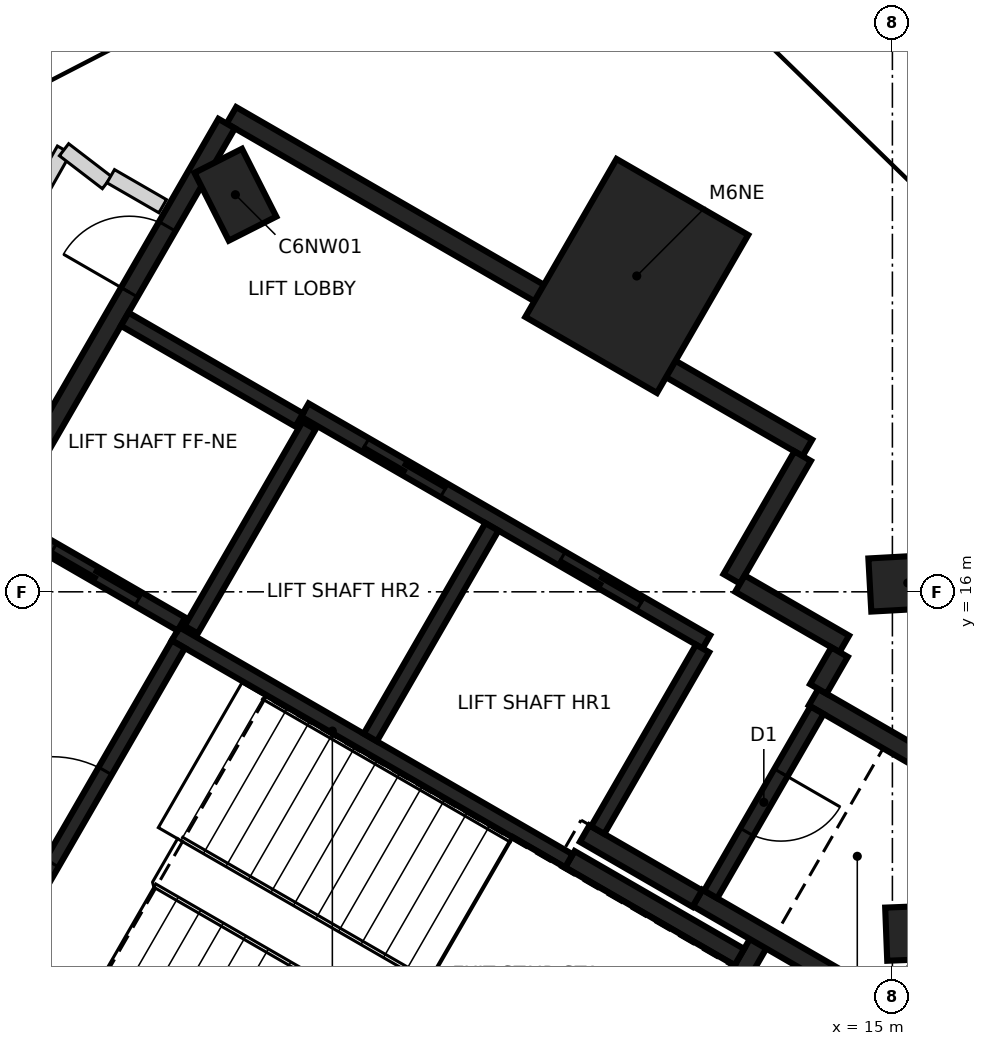
"""IFC4 building model, lengths in metres.
Left out: names, types, materials, properties, quantities, classifications, styles, units other than length and angle.
Written with IfcOpenShell. Run it as: python <this file> out.ifc"""

import sys

from ifc_helpers import new_model, si_unit, direction, frame, frame_2d, origin, origin_2d, place, context, subcontext, project, spatial, rectangle, extrude, element, fill, save


model = new_model("IFC4")
c1 = context("Model", 3, precision=1e-05, world=origin(), true_north=direction((0.0, 1.0)))
c2 = subcontext(c1, "Body", "Model", "MODEL_VIEW")
j1 = project(units=[si_unit("LENGTHUNIT", "METRE"), si_unit("PLANEANGLEUNIT", "RADIAN")], contexts=[c1])
p1 = place(None, origin())
s1 = spatial("IfcSite", under=j1, at=p1, CompositionType="ELEMENT")
p2 = place(p1, origin())
s2 = spatial("IfcBuilding", under=s1, at=p2, CompositionType="ELEMENT")
p3 = place(p2, frame((0.0, 0.0, 280.2)))
s3 = spatial("IfcBuildingStorey", under=s2, at=p3, CompositionType="ELEMENT", Elevation=280.2)
for number, where, z_axis, x_axis in (
    (1, (15.418, 11.515, -0.35), (0.0, 0.0, 1.0), (0.999, 0.039, 0.0)),
    (2, (15.202, 16.117, -0.35), (0.0, 0.0, 1.0), (0.998, 0.055, 0.0)),
    (3, (6.356, 21.224, -0.35), (0.0, 0.0, 1.0), (-0.452, 0.892, 0.0)),
):
    element("IfcColumn", number, at=place(p3, frame(where, z_axis=z_axis, x_axis=x_axis)), inside=s3, PredefinedType="COLUMN", context=c2, shape_type="SweptSolid", body=[
        extrude(rectangle(XDim=1.0, YDim=0.7, at=origin_2d()), origin(), (0.0, 0.0, 1.0), 3.6),
    ])
p4 = place(p3, frame((11.637, 20.155, -0.35), z_axis=(0.0, 0.0, 1.0), x_axis=(0.5, 0.866025403784, 0.0)))
e4 = element("IfcColumn", 4, at=p4, inside=s3, PredefinedType="COLUMN", context=c2, shape_type="SweptSolid", body=[
    extrude(rectangle(XDim=2.4, YDim=2.0, at=origin_2d()), origin(), (0.0, 0.0, 1.0), 3.6),
])
p5 = place(p3, frame((10.42, 6.498, 0.0), z_axis=(0.0, 0.0, 1.0), x_axis=(-0.866021906294, 0.500006057782, 0.0)))
e5 = element("IfcWall", 5, at=p5, inside=s3, PredefinedType="SHEAR", context=c2, shape_type="SweptSolid", body=[
    extrude(rectangle(XDim=11.55, YDim=0.25, at=frame_2d((5.775, 0.0))), origin(), (0.0, 0.0, 1.0), 3.25),
])
p6 = place(p5, frame((10.025, 0.0, 0.0)))
e6 = element("IfcOpeningElement", 6, at=p6, cuts=e5, PredefinedType="OPENING", context=c2, shape_type="SweptSolid", body=[
    extrude(rectangle(XDim=1.2, YDim=2.1, at=frame_2d((0.6, 1.05))), frame((0.0, 0.135, 0.0), z_axis=(0.0, -1.0, 0.0), x_axis=(1.0, 0.0, 0.0)), (0.0, 0.0, 1.0), 0.27),
])
p7 = place(p5, frame((8.725, 0.0, 0.0)))
e7 = element("IfcOpeningElement", 7, at=p7, cuts=e5, PredefinedType="OPENING", context=c2, shape_type="SweptSolid", body=[
    extrude(rectangle(XDim=1.2, YDim=2.1, at=frame_2d((0.6, 1.05))), frame((0.0, 0.135, 0.0), z_axis=(0.0, -1.0, 0.0), x_axis=(1.0, 0.0, 0.0)), (0.0, 0.0, 1.0), 0.27),
])
p8 = place(p3, frame((6.304, 22.269, 0.0), z_axis=(0.0, 0.0, 1.0), x_axis=(0.866022959057, -0.500004234368, 0.0)))
e8 = element("IfcWall", 8, at=p8, inside=s3, PredefinedType="SHEAR", context=c2, shape_type="SweptSolid", body=[
    extrude(rectangle(XDim=8.75, YDim=0.25, at=frame_2d((4.375, 0.0))), origin(), (0.0, 0.0, 1.0), 3.25),
])
p9 = place(p3, frame((3.179, 16.856, 0.0), z_axis=(0.0, 0.0, 1.0), x_axis=(0.500001955336, 0.866024274868, 0.0)))
e9 = element("IfcWall", 9, at=p9, inside=s3, PredefinedType="SHEAR", context=c2, shape_type="SweptSolid", body=[
    extrude(rectangle(XDim=6.125, YDim=0.25, at=frame_2d((3.062, 0.0))), origin(), (0.0, 0.0, 1.0), 3.25),
])
p10 = place(p9, frame((3.563, 0.0, 0.0)))
e10 = element("IfcOpeningElement", 10, at=p10, cuts=e9, PredefinedType="OPENING", context=c2, shape_type="SweptSolid", body=[
    extrude(rectangle(XDim=1.0, YDim=2.1, at=frame_2d((0.5, 1.05))), frame((0.0, 0.135, 0.0), z_axis=(0.0, -1.0, 0.0), x_axis=(1.0, 0.0, 0.0)), (0.0, 0.0, 1.0), 0.27),
])
p11 = place(p3, frame((13.238, 11.378, 0.0), z_axis=(0.0, 0.0, 1.0), x_axis=(-0.500008851346, -0.866020293397, 0.0)))
e11 = element("IfcWall", 11, at=p11, inside=s3, PredefinedType="SHEAR", context=c2, shape_type="SweptSolid", body=[
    extrude(rectangle(XDim=5.51, YDim=0.25, at=frame_2d((2.755, 0.0))), origin(), (0.0, 0.0, 1.0), 3.25),
])
p12 = place(p3, frame((16.552, 13.119, 0.0), z_axis=(0.0, 0.0, 1.0), x_axis=(-0.499978833458, -0.866037623948, 0.0)))
e12 = element("IfcWall", 12, at=p12, inside=s3, PredefinedType="SHEAR", context=c2, shape_type="SweptSolid", body=[
    extrude(rectangle(XDim=3.05, YDim=0.25, at=frame_2d((1.525, 0.0))), origin(), (0.0, 0.0, 1.0), 3.25),
])
p13 = place(p3, frame((14.918, 10.54, 0.0), z_axis=(0.0, 0.0, 1.0), x_axis=(-0.866063538972, 0.499933942099, 0.0)))
e13 = element("IfcWall", 13, at=p13, inside=s3, PredefinedType="SHEAR", context=c2, shape_type="SweptSolid", body=[
    extrude(rectangle(XDim=2.865, YDim=0.25, at=frame_2d((1.432, 0.0))), origin(), (0.0, 0.0, 1.0), 3.25),
])
p14 = place(p3, frame((13.963, 14.614, 0.0), z_axis=(0.0, 0.0, 1.0), x_axis=(0.866042235819, -0.499970844928, 0.0)))
e14 = element("IfcWall", 14, at=p14, inside=s3, PredefinedType="SHEAR", context=c2, shape_type="SweptSolid", body=[
    extrude(rectangle(XDim=2.865, YDim=0.25, at=frame_2d((1.432, 0.0))), origin(), (0.0, 0.0, 1.0), 3.25),
])
p15 = place(p3, frame((10.757, 12.481, 0.0), z_axis=(0.0, 0.0, 1.0), x_axis=(0.866022940537, -0.500004266446, 0.0)))
e15 = element("IfcWall", 15, at=p15, inside=s3, PredefinedType="SHEAR", context=c2, shape_type="SweptSolid", body=[
    extrude(rectangle(XDim=2.575, YDim=0.25, at=frame_2d((1.287, 0.0))), origin(), (0.0, 0.0, 1.0), 3.25),
])
p16 = place(p3, frame((13.819, 17.785, 0.0), z_axis=(0.0, 0.0, 1.0), x_axis=(-0.500039802285, -0.866002422705, 0.0)))
e16 = element("IfcWall", 16, at=p16, inside=s3, PredefinedType="SHEAR", context=c2, shape_type="SweptSolid", body=[
    extrude(rectangle(XDim=1.865, YDim=0.25, at=frame_2d((0.932, 0.0))), origin(), (0.0, 0.0, 1.0), 3.25),
])
p17 = place(p3, frame((12.433, 11.964, 0.0), z_axis=(0.0, 0.0, 1.0), x_axis=(-0.866038183914, 0.499977863513, 0.0)))
e17 = element("IfcWall", 17, at=p17, inside=s3, PredefinedType="SHEAR", context=c2, shape_type="SweptSolid", body=[
    extrude(rectangle(XDim=1.71, YDim=0.25, at=frame_2d((0.855, 0.0))), origin(), (0.0, 0.0, 1.0), 3.25),
])
p18 = place(p3, frame((12.995, 16.108, 0.0), z_axis=(0.0, 0.0, 1.0), x_axis=(0.866044474677, -0.49996696679, 0.0)))
e18 = element("IfcWall", 18, at=p18, inside=s3, PredefinedType="SHEAR", context=c2, shape_type="SweptSolid", body=[
    extrude(rectangle(XDim=1.584, YDim=0.25, at=frame_2d((0.792, 0.0))), origin(), (0.0, 0.0, 1.0), 3.25),
])
p19 = place(p3, frame((14.305, 15.207, 0.0), z_axis=(0.0, 0.0, 1.0), x_axis=(-0.499848422343, -0.866112899501, 0.0)))
e19 = element("IfcWall", 19, at=p19, inside=s3, PredefinedType="SHEAR", context=c2, shape_type="SweptSolid", body=[
    extrude(rectangle(XDim=0.559, YDim=0.25, at=frame_2d((0.28, 0.0))), origin(), (0.0, 0.0, 1.0), 3.25),
])
p20 = place(p3, frame((12.552, 15.342, 0.0), z_axis=(0.0, 0.0, 1.0), x_axis=(-0.866030299012, 0.499991521122, 0.0)))
e20 = element("IfcWall", 20, at=p20, inside=s3, PredefinedType="SHEAR", context=c2, shape_type="SweptSolid", body=[
    extrude(rectangle(XDim=6.1, YDim=0.2, at=frame_2d((3.05, 0.0))), origin(), (0.0, 0.0, 1.0), 3.25),
])
p21 = place(p20, frame((1.0, 0.0, 0.0)))
e21 = element("IfcOpeningElement", 21, at=p21, cuts=e20, PredefinedType="OPENING", context=c2, shape_type="SweptSolid", body=[
    extrude(rectangle(XDim=1.2, YDim=2.1, at=frame_2d((0.6, 1.05))), frame((0.0, 0.11, 0.0), z_axis=(0.0, -1.0, 0.0), x_axis=(1.0, 0.0, 0.0)), (0.0, 0.0, 1.0), 0.22),
])
p22 = place(p20, frame((3.982, 0.0, 0.0)))
e22 = element("IfcOpeningElement", 22, at=p22, cuts=e20, PredefinedType="OPENING", context=c2, shape_type="SweptSolid", body=[
    extrude(rectangle(XDim=1.2, YDim=2.1, at=frame_2d((0.6, 1.05))), frame((0.0, 0.11, 0.0), z_axis=(0.0, -1.0, 0.0), x_axis=(1.0, 0.0, 0.0)), (0.0, 0.0, 1.0), 0.22),
])
p23 = place(p3, frame((10.743, 12.46, 0.0), z_axis=(0.0, 0.0, 1.0), x_axis=(-0.866018848283, 0.500011354289, 0.0)))
e23 = element("IfcWall", 23, at=p23, inside=s3, PredefinedType="SHEAR", context=c2, shape_type="SweptSolid", body=[
    extrude(rectangle(XDim=5.974, YDim=0.2, at=frame_2d((2.987, 0.0))), origin(), (0.0, 0.0, 1.0), 3.25),
])
p24 = place(p3, frame((3.057, 10.895, 0.0), z_axis=(0.0, 0.0, 1.0), x_axis=(0.500027839223, 0.866009330205, 0.0)))
e24 = element("IfcWall", 24, at=p24, inside=s3, PredefinedType="SHEAR", context=c2, shape_type="SweptSolid", body=[
    extrude(rectangle(XDim=5.098, YDim=0.2, at=frame_2d((2.549, 0.0))), origin(), (0.0, 0.0, 1.0), 3.25),
])
p25 = place(p24, frame((1.774, 0.0, 0.0)))
e25 = element("IfcOpeningElement", 25, at=p25, cuts=e24, PredefinedType="OPENING", context=c2, shape_type="SweptSolid", body=[
    extrude(rectangle(XDim=1.4, YDim=2.1, at=frame_2d((0.7, 1.05))), frame((0.0, 0.11, 0.0), z_axis=(0.0, -1.0, 0.0), x_axis=(1.0, 0.0, 0.0)), (0.0, 0.0, 1.0), 0.22),
])
p26 = place(p3, frame((8.132, 14.084, 0.0), z_axis=(0.0, 0.0, 1.0), x_axis=(0.500030834389, 0.86600760081, 0.0)))
e26 = element("IfcWall", 26, at=p26, inside=s3, PredefinedType="SHEAR", context=c2, shape_type="SweptSolid", body=[
    extrude(rectangle(XDim=3.198, YDim=0.2, at=frame_2d((1.599, 0.0))), origin(), (0.0, 0.0, 1.0), 3.25),
])
p27 = place(p3, frame((14.008, 14.442, 0.0), z_axis=(0.0, 0.0, 1.0), x_axis=(-0.499986818241, -0.866033014143, 0.0)))
e27 = element("IfcWall", 27, at=p27, inside=s3, PredefinedType="SHEAR", context=c2, shape_type="SweptSolid", body=[
    extrude(rectangle(XDim=2.798, YDim=0.2, at=frame_2d((1.399, 0.0))), origin(), (0.0, 0.0, 1.0), 3.25),
])
p28 = place(p27, frame((0.949, 0.0, 0.0)))
e28 = element("IfcOpeningElement", 28, at=p28, cuts=e27, PredefinedType="OPENING", context=c2, shape_type="SweptSolid", body=[
    extrude(rectangle(XDim=0.9, YDim=2.1, at=frame_2d((0.45, 1.05))), frame((0.0, 0.11, 0.0), z_axis=(0.0, -1.0, 0.0), x_axis=(1.0, 0.0, 0.0)), (0.0, 0.0, 1.0), 0.22),
])
p29 = place(p3, frame((12.502, 15.255, 0.0), z_axis=(0.0, 0.0, 1.0), x_axis=(-0.499965018551, -0.866045599391, 0.0)))
e29 = element("IfcWall", 29, at=p29, inside=s3, PredefinedType="SHEAR", context=c2, shape_type="SweptSolid", body=[
    extrude(rectangle(XDim=2.759, YDim=0.2, at=frame_2d((1.379, 0.0))), origin(), (0.0, 0.0, 1.0), 3.25),
])
p30 = place(p3, frame((7.324, 18.187, 0.0), z_axis=(0.0, 0.0, 1.0), x_axis=(-0.499967891604, -0.866043940782, 0.0)))
e30 = element("IfcWall", 30, at=p30, inside=s3, PredefinedType="SHEAR", context=c2, shape_type="SweptSolid", body=[
    extrude(rectangle(XDim=3.1, YDim=0.2, at=frame_2d((1.55, 0.0))), origin(), (0.0, 0.0, 1.0), 3.25),
])
p31 = place(p3, frame((5.646, 15.576, 0.0), z_axis=(0.0, 0.0, 1.0), x_axis=(-0.866018407898, 0.500012117035, 0.0)))
e31 = element("IfcWall", 31, at=p31, inside=s3, PredefinedType="SHEAR", context=c2, shape_type="SweptSolid", body=[
    extrude(rectangle(XDim=2.651, YDim=0.2, at=frame_2d((1.325, 0.0))), origin(), (0.0, 0.0, 1.0), 3.25),
])
p32 = place(p31, frame((0.652, 0.0, 0.0)))
e32 = element("IfcOpeningElement", 32, at=p32, cuts=e31, PredefinedType="OPENING", context=c2, shape_type="SweptSolid", body=[
    extrude(rectangle(XDim=1.3, YDim=2.1, at=frame_2d((0.65, 1.05))), frame((0.0, 0.11, 0.0), z_axis=(0.0, -1.0, 0.0), x_axis=(1.0, 0.0, 0.0)), (0.0, 0.0, 1.0), 0.22),
])
p33 = place(p3, frame((7.196, 18.26, 0.0), z_axis=(0.0, 0.0, 1.0), x_axis=(-0.866018407898, 0.500012117035, 0.0)))
e33 = element("IfcWall", 33, at=p33, inside=s3, PredefinedType="SHEAR", context=c2, shape_type="SweptSolid", body=[
    extrude(rectangle(XDim=2.651, YDim=0.2, at=frame_2d((1.325, 0.0))), origin(), (0.0, 0.0, 1.0), 3.25),
])
p34 = place(p3, frame((2.971, 19.817, 0.0), z_axis=(0.0, 0.0, 1.0), x_axis=(0.492596700535, 0.870257715061, 0.0)))
e34 = element("IfcWall", 34, at=p34, inside=s3, PredefinedType="PARTITIONING", context=c2, shape_type="SweptSolid", body=[
    extrude(rectangle(XDim=2.296, YDim=0.2, at=frame_2d((1.148, 0.0))), origin(), (0.0, 0.0, 1.0), 3.25),
])
p35 = place(p3, frame((4.102, 21.816, 0.0), z_axis=(0.0, 0.0, 1.0), x_axis=(0.793783006464, -0.608201067615, 0.0)))
e35 = element("IfcWall", 35, at=p35, inside=s3, PredefinedType="PARTITIONING", context=c2, shape_type="SweptSolid", body=[
    extrude(rectangle(XDim=0.712, YDim=0.2, at=frame_2d((0.356, 0.0))), origin(), (0.0, 0.0, 1.0), 3.25),
])
p36 = place(p3, frame((4.716, 21.468, 0.0), z_axis=(0.0, 0.0, 1.0), x_axis=(0.865912682783, -0.500195187698, 0.0)))
e36 = element("IfcWall", 36, at=p36, inside=s3, PredefinedType="PARTITIONING", context=c2, shape_type="SweptSolid", body=[
    extrude(rectangle(XDim=0.79, YDim=0.2, at=frame_2d((0.395, 0.0))), origin(), (0.0, 0.0, 1.0), 3.25),
])
p37 = place(p32, origin())
e37 = element("IfcDoor", 37, at=p37, inside=s3, OperationType="SLIDING_TO_LEFT", PredefinedType="DOOR", context=c2, shape_type="SweptSolid", body=[
    extrude(rectangle(XDim=1.3, YDim=2.1, at=frame_2d((0.65, 1.05))), frame((0.0, 0.025, 0.0), z_axis=(0.0, -1.0, 0.0), x_axis=(1.0, 0.0, 0.0)), (0.0, 0.0, 1.0), 0.05),
])
fill(e32, e37)
p38 = place(p21, origin())
e38 = element("IfcDoor", 38, at=p38, inside=s3, OperationType="DOUBLE_DOOR_SLIDING", PredefinedType="DOOR", context=c2, shape_type="SweptSolid", body=[
    extrude(rectangle(XDim=1.2, YDim=2.1, at=frame_2d((0.6, 1.05))), frame((0.0, 0.025, 0.0), z_axis=(0.0, -1.0, 0.0), x_axis=(1.0, 0.0, 0.0)), (0.0, 0.0, 1.0), 0.05),
])
fill(e21, e38)
p39 = place(p22, origin())
e39 = element("IfcDoor", 39, at=p39, inside=s3, OperationType="DOUBLE_DOOR_SLIDING", PredefinedType="DOOR", context=c2, shape_type="SweptSolid", body=[
    extrude(rectangle(XDim=1.2, YDim=2.1, at=frame_2d((0.6, 1.05))), frame((0.0, 0.025, 0.0), z_axis=(0.0, -1.0, 0.0), x_axis=(1.0, 0.0, 0.0)), (0.0, 0.0, 1.0), 0.05),
])
fill(e22, e39)
p40 = place(p10, origin())
e40 = element("IfcDoor", 40, at=p40, inside=s3, OperationType="SINGLE_SWING_LEFT", PredefinedType="DOOR", context=c2, shape_type="SweptSolid", body=[
    extrude(rectangle(XDim=1.0, YDim=2.1, at=frame_2d((0.5, 1.05))), frame((0.0, 0.025, 0.0), z_axis=(0.0, -1.0, 0.0), x_axis=(1.0, 0.0, 0.0)), (0.0, 0.0, 1.0), 0.05),
])
fill(e10, e40)
p41 = place(p25, origin())
e41 = element("IfcDoor", 41, at=p41, inside=s3, OperationType="SINGLE_SWING_LEFT", PredefinedType="DOOR", context=c2, shape_type="SweptSolid", body=[
    extrude(rectangle(XDim=1.4, YDim=2.1, at=frame_2d((0.7, 1.05))), frame((0.0, 0.025, 0.0), z_axis=(0.0, -1.0, 0.0), x_axis=(1.0, 0.0, 0.0)), (0.0, 0.0, 1.0), 0.05),
])
fill(e25, e41)
p42 = place(p28, origin())
e42 = element("IfcDoor", 42, at=p42, inside=s3, OperationType="SINGLE_SWING_RIGHT", PredefinedType="DOOR", context=c2, shape_type="SweptSolid", body=[
    extrude(rectangle(XDim=0.9, YDim=2.1, at=frame_2d((0.45, 1.05))), frame((0.0, 0.025, 0.0), z_axis=(0.0, -1.0, 0.0), x_axis=(1.0, 0.0, 0.0)), (0.0, 0.0, 1.0), 0.05),
])
fill(e28, e42)
save(model, sys.argv[1])
